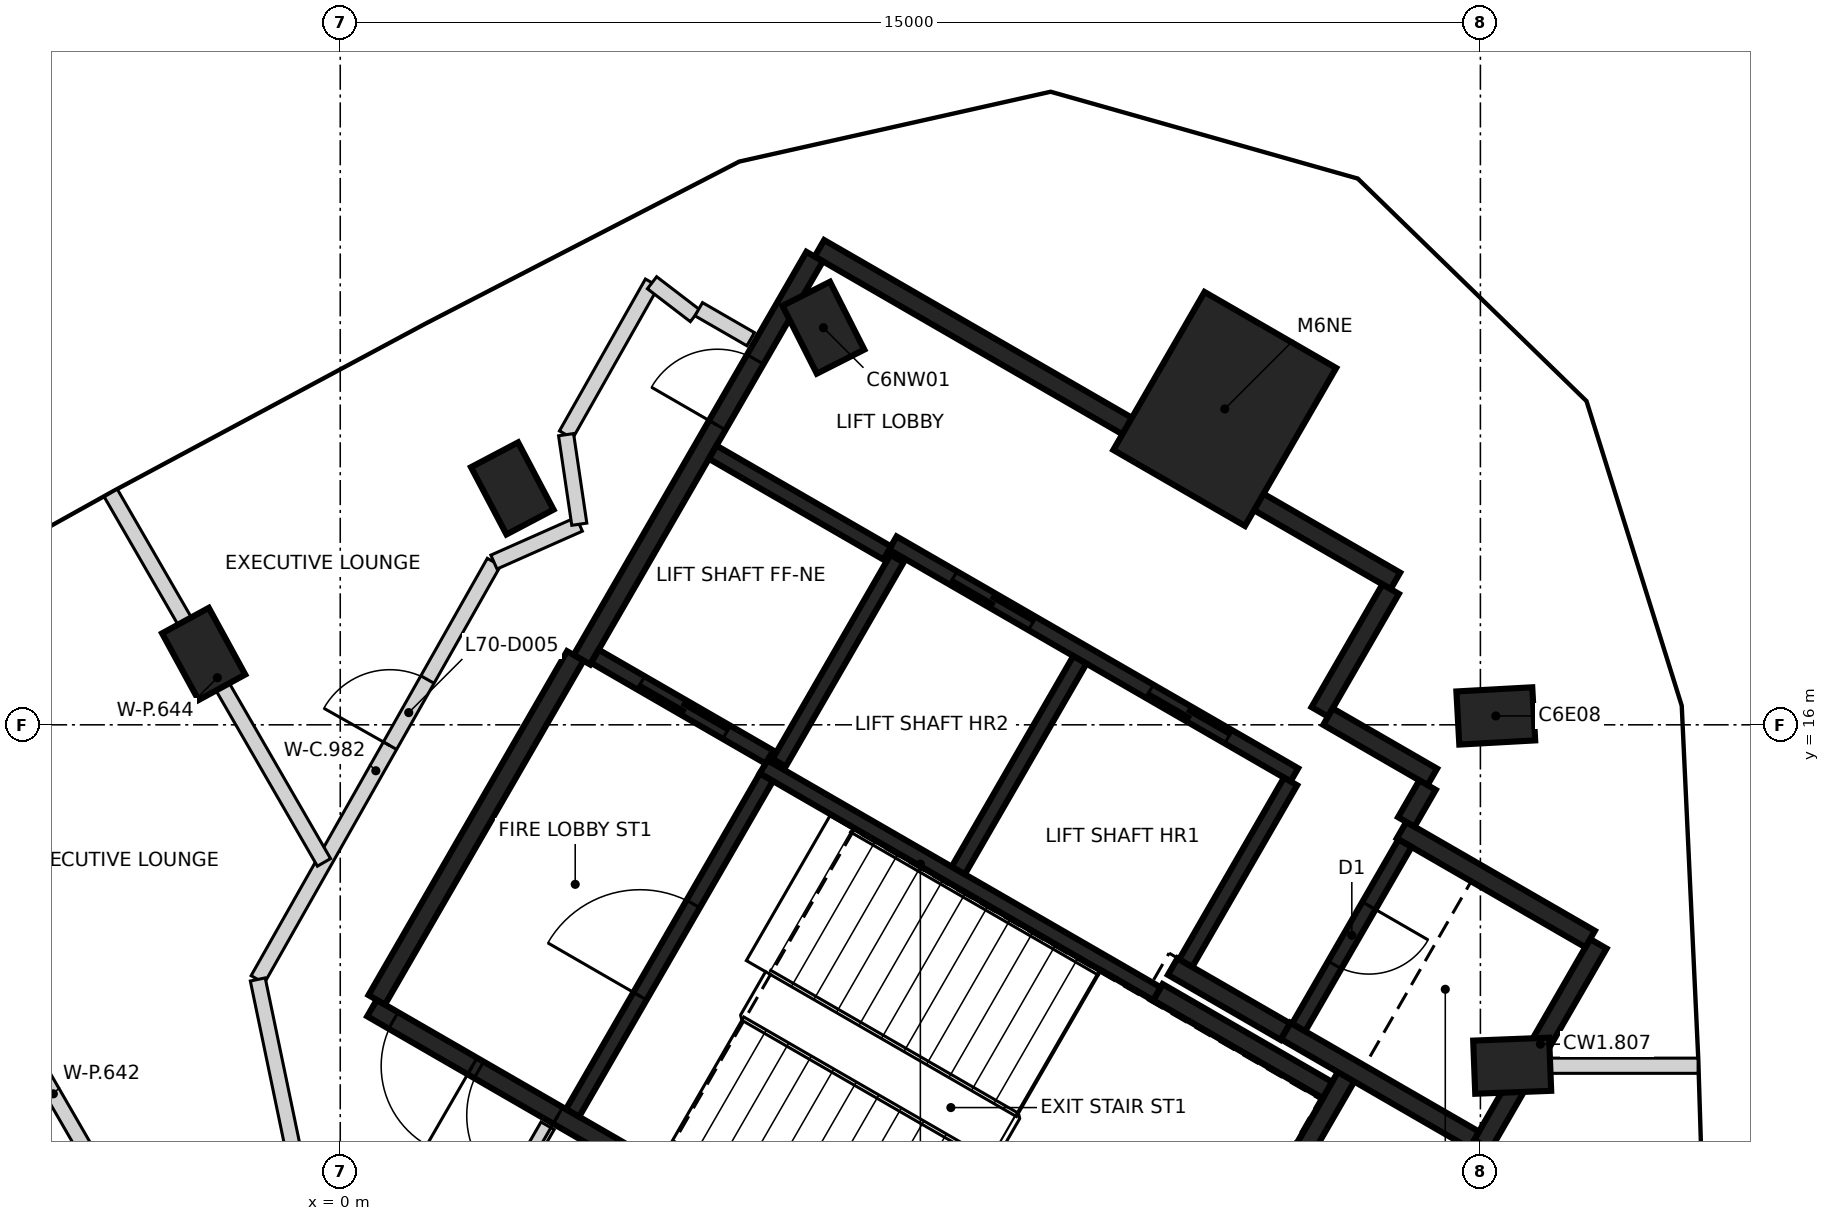
"""IFC4 building model, lengths in metres.
Left out: names, types, materials, properties, quantities, classifications, styles, units other than length and angle.
Written with IfcOpenShell. Run it as: python <this file> out.ifc"""

import sys

from ifc_helpers import new_model, si_unit, direction, frame, frame_2d, origin, origin_2d, place, context, subcontext, project, spatial, rectangle, extrude, element, fill, save


model = new_model("IFC4")
c1 = context("Model", 3, precision=1e-05, world=origin(), true_north=direction((0.0, 1.0)))
c2 = subcontext(c1, "Body", "Model", "MODEL_VIEW")
j1 = project(units=[si_unit("LENGTHUNIT", "METRE"), si_unit("PLANEANGLEUNIT", "RADIAN")], contexts=[c1])
p1 = place(None, origin())
s1 = spatial("IfcSite", under=j1, at=p1, CompositionType="ELEMENT")
p2 = place(p1, origin())
s2 = spatial("IfcBuilding", under=s1, at=p2, CompositionType="ELEMENT")
p3 = place(p2, frame((0.0, 0.0, 276.6)))
s3 = spatial("IfcBuildingStorey", under=s2, at=p3, CompositionType="ELEMENT", Elevation=276.6)
for number, where, z_axis, x_axis in (
    (1, (15.418, 11.515, -0.35), (0.0, 0.0, 1.0), (0.999, 0.039, 0.0)),
    (2, (15.202, 16.117, -0.35), (0.0, 0.0, 1.0), (0.998, 0.055, 0.0)),
    (3, (6.356, 21.224, -0.35), (0.0, 0.0, 1.0), (-0.452, 0.892, 0.0)),
    (4, (2.263, 19.11, -0.35), (0.0, 0.0, 1.0), (-0.466, 0.885, 0.0)),
    (5, (-1.797, 16.932, -0.35), (0.0, 0.0, 1.0), (-0.479, 0.878, 0.0)),
):
    element("IfcColumn", number, at=place(p3, frame(where, z_axis=z_axis, x_axis=x_axis)), inside=s3, PredefinedType="COLUMN", context=c2, shape_type="SweptSolid", body=[
        extrude(rectangle(XDim=1.0, YDim=0.7, at=origin_2d()), origin(), (0.0, 0.0, 1.0), 3.6),
    ])
p4 = place(p3, frame((11.637, 20.155, -0.35), z_axis=(0.0, 0.0, 1.0), x_axis=(0.5, 0.866025403784, 0.0)))
e6 = element("IfcColumn", 6, at=p4, inside=s3, PredefinedType="COLUMN", context=c2, shape_type="SweptSolid", body=[
    extrude(rectangle(XDim=2.4, YDim=2.0, at=origin_2d()), origin(), (0.0, 0.0, 1.0), 3.6),
])
p5 = place(p3, frame((10.42, 6.498, 0.0), z_axis=(0.0, 0.0, 1.0), x_axis=(-0.866021906294, 0.500006057782, 0.0)))
e7 = element("IfcWall", 7, at=p5, inside=s3, PredefinedType="SHEAR", context=c2, shape_type="SweptSolid", body=[
    extrude(rectangle(XDim=11.55, YDim=0.25, at=frame_2d((5.775, 0.0))), origin(), (0.0, 0.0, 1.0), 3.25),
])
p6 = place(p5, frame((10.025, 0.0, 0.0)))
e8 = element("IfcOpeningElement", 8, at=p6, cuts=e7, PredefinedType="OPENING", context=c2, shape_type="SweptSolid", body=[
    extrude(rectangle(XDim=1.2, YDim=2.1, at=frame_2d((0.6, 1.05))), frame((0.0, 0.135, 0.0), z_axis=(0.0, -1.0, 0.0), x_axis=(1.0, 0.0, 0.0)), (0.0, 0.0, 1.0), 0.27),
])
p7 = place(p5, frame((8.725, 0.0, 0.0)))
e9 = element("IfcOpeningElement", 9, at=p7, cuts=e7, PredefinedType="OPENING", context=c2, shape_type="SweptSolid", body=[
    extrude(rectangle(XDim=1.2, YDim=2.1, at=frame_2d((0.6, 1.05))), frame((0.0, 0.135, 0.0), z_axis=(0.0, -1.0, 0.0), x_axis=(1.0, 0.0, 0.0)), (0.0, 0.0, 1.0), 0.27),
])
p8 = place(p3, frame((6.304, 22.269, 0.0), z_axis=(0.0, 0.0, 1.0), x_axis=(0.866022959057, -0.500004234368, 0.0)))
e10 = element("IfcWall", 10, at=p8, inside=s3, PredefinedType="SHEAR", context=c2, shape_type="SweptSolid", body=[
    extrude(rectangle(XDim=8.75, YDim=0.25, at=frame_2d((4.375, 0.0))), origin(), (0.0, 0.0, 1.0), 3.25),
])
p9 = place(p3, frame((3.179, 16.856, 0.0), z_axis=(0.0, 0.0, 1.0), x_axis=(0.500001955336, 0.866024274868, 0.0)))
e11 = element("IfcWall", 11, at=p9, inside=s3, PredefinedType="SHEAR", context=c2, shape_type="SweptSolid", body=[
    extrude(rectangle(XDim=6.125, YDim=0.25, at=frame_2d((3.062, 0.0))), origin(), (0.0, 0.0, 1.0), 3.25),
])
p10 = place(p9, frame((3.563, 0.0, 0.0)))
e12 = element("IfcOpeningElement", 12, at=p10, cuts=e11, PredefinedType="OPENING", context=c2, shape_type="SweptSolid", body=[
    extrude(rectangle(XDim=1.0, YDim=2.1, at=frame_2d((0.5, 1.05))), frame((0.0, 0.135, 0.0), z_axis=(0.0, -1.0, 0.0), x_axis=(1.0, 0.0, 0.0)), (0.0, 0.0, 1.0), 0.27),
])
p11 = place(p3, frame((0.48, 12.381, 0.0), z_axis=(0.0, 0.0, 1.0), x_axis=(0.49999885962, 0.866026062182, 0.0)))
e13 = element("IfcWall", 13, at=p11, inside=s3, PredefinedType="SHEAR", context=c2, shape_type="SweptSolid", body=[
    extrude(rectangle(XDim=5.225, YDim=0.25, at=frame_2d((2.612, 0.0))), origin(), (0.0, 0.0, 1.0), 3.25),
])
p12 = place(p3, frame((13.238, 11.378, 0.0), z_axis=(0.0, 0.0, 1.0), x_axis=(-0.500008851346, -0.866020293397, 0.0)))
e14 = element("IfcWall", 14, at=p12, inside=s3, PredefinedType="SHEAR", context=c2, shape_type="SweptSolid", body=[
    extrude(rectangle(XDim=5.51, YDim=0.25, at=frame_2d((2.755, 0.0))), origin(), (0.0, 0.0, 1.0), 3.25),
])
p13 = place(p3, frame((16.552, 13.119, 0.0), z_axis=(0.0, 0.0, 1.0), x_axis=(-0.499978833458, -0.866037623948, 0.0)))
e15 = element("IfcWall", 15, at=p13, inside=s3, PredefinedType="SHEAR", context=c2, shape_type="SweptSolid", body=[
    extrude(rectangle(XDim=3.05, YDim=0.25, at=frame_2d((1.525, 0.0))), origin(), (0.0, 0.0, 1.0), 3.25),
])
p14 = place(p3, frame((14.918, 10.54, 0.0), z_axis=(0.0, 0.0, 1.0), x_axis=(-0.866063538972, 0.499933942099, 0.0)))
e16 = element("IfcWall", 16, at=p14, inside=s3, PredefinedType="SHEAR", context=c2, shape_type="SweptSolid", body=[
    extrude(rectangle(XDim=2.865, YDim=0.25, at=frame_2d((1.432, 0.0))), origin(), (0.0, 0.0, 1.0), 3.25),
])
p15 = place(p3, frame((13.963, 14.614, 0.0), z_axis=(0.0, 0.0, 1.0), x_axis=(0.866042235819, -0.499970844928, 0.0)))
e17 = element("IfcWall", 17, at=p15, inside=s3, PredefinedType="SHEAR", context=c2, shape_type="SweptSolid", body=[
    extrude(rectangle(XDim=2.865, YDim=0.25, at=frame_2d((1.432, 0.0))), origin(), (0.0, 0.0, 1.0), 3.25),
])
p16 = place(p3, frame((10.757, 12.481, 0.0), z_axis=(0.0, 0.0, 1.0), x_axis=(0.866022940537, -0.500004266446, 0.0)))
e18 = element("IfcWall", 18, at=p16, inside=s3, PredefinedType="SHEAR", context=c2, shape_type="SweptSolid", body=[
    extrude(rectangle(XDim=2.575, YDim=0.25, at=frame_2d((1.287, 0.0))), origin(), (0.0, 0.0, 1.0), 3.25),
])
p17 = place(p3, frame((13.819, 17.785, 0.0), z_axis=(0.0, 0.0, 1.0), x_axis=(-0.500039802285, -0.866002422705, 0.0)))
e19 = element("IfcWall", 19, at=p17, inside=s3, PredefinedType="SHEAR", context=c2, shape_type="SweptSolid", body=[
    extrude(rectangle(XDim=1.865, YDim=0.25, at=frame_2d((0.932, 0.0))), origin(), (0.0, 0.0, 1.0), 3.25),
])
p18 = place(p3, frame((12.433, 11.964, 0.0), z_axis=(0.0, 0.0, 1.0), x_axis=(-0.866038183914, 0.499977863513, 0.0)))
e20 = element("IfcWall", 20, at=p18, inside=s3, PredefinedType="SHEAR", context=c2, shape_type="SweptSolid", body=[
    extrude(rectangle(XDim=1.71, YDim=0.25, at=frame_2d((0.855, 0.0))), origin(), (0.0, 0.0, 1.0), 3.25),
])
p19 = place(p3, frame((12.995, 16.108, 0.0), z_axis=(0.0, 0.0, 1.0), x_axis=(0.866044474677, -0.49996696679, 0.0)))
e21 = element("IfcWall", 21, at=p19, inside=s3, PredefinedType="SHEAR", context=c2, shape_type="SweptSolid", body=[
    extrude(rectangle(XDim=1.584, YDim=0.25, at=frame_2d((0.792, 0.0))), origin(), (0.0, 0.0, 1.0), 3.25),
])
p20 = place(p3, frame((14.305, 15.207, 0.0), z_axis=(0.0, 0.0, 1.0), x_axis=(-0.499848422343, -0.866112899501, 0.0)))
e22 = element("IfcWall", 22, at=p20, inside=s3, PredefinedType="SHEAR", context=c2, shape_type="SweptSolid", body=[
    extrude(rectangle(XDim=0.559, YDim=0.25, at=frame_2d((0.28, 0.0))), origin(), (0.0, 0.0, 1.0), 3.25),
])
p21 = place(p3, frame((12.552, 15.342, 0.0), z_axis=(0.0, 0.0, 1.0), x_axis=(-0.866030299012, 0.499991521122, 0.0)))
e23 = element("IfcWall", 23, at=p21, inside=s3, PredefinedType="SHEAR", context=c2, shape_type="SweptSolid", body=[
    extrude(rectangle(XDim=6.1, YDim=0.2, at=frame_2d((3.05, 0.0))), origin(), (0.0, 0.0, 1.0), 3.25),
])
p22 = place(p21, frame((1.0, 0.0, 0.0)))
e24 = element("IfcOpeningElement", 24, at=p22, cuts=e23, PredefinedType="OPENING", context=c2, shape_type="SweptSolid", body=[
    extrude(rectangle(XDim=1.2, YDim=2.1, at=frame_2d((0.6, 1.05))), frame((0.0, 0.11, 0.0), z_axis=(0.0, -1.0, 0.0), x_axis=(1.0, 0.0, 0.0)), (0.0, 0.0, 1.0), 0.22),
])
p23 = place(p21, frame((3.982, 0.0, 0.0)))
e25 = element("IfcOpeningElement", 25, at=p23, cuts=e23, PredefinedType="OPENING", context=c2, shape_type="SweptSolid", body=[
    extrude(rectangle(XDim=1.2, YDim=2.1, at=frame_2d((0.6, 1.05))), frame((0.0, 0.11, 0.0), z_axis=(0.0, -1.0, 0.0), x_axis=(1.0, 0.0, 0.0)), (0.0, 0.0, 1.0), 0.22),
])
p24 = place(p3, frame((10.743, 12.46, 0.0), z_axis=(0.0, 0.0, 1.0), x_axis=(-0.866018848283, 0.500011354289, 0.0)))
e26 = element("IfcWall", 26, at=p24, inside=s3, PredefinedType="SHEAR", context=c2, shape_type="SweptSolid", body=[
    extrude(rectangle(XDim=5.974, YDim=0.2, at=frame_2d((2.987, 0.0))), origin(), (0.0, 0.0, 1.0), 3.25),
])
p25 = place(p3, frame((3.057, 10.895, 0.0), z_axis=(0.0, 0.0, 1.0), x_axis=(0.500027839223, 0.866009330205, 0.0)))
e27 = element("IfcWall", 27, at=p25, inside=s3, PredefinedType="SHEAR", context=c2, shape_type="SweptSolid", body=[
    extrude(rectangle(XDim=5.098, YDim=0.2, at=frame_2d((2.549, 0.0))), origin(), (0.0, 0.0, 1.0), 3.25),
])
p26 = place(p25, frame((1.774, 0.0, 0.0)))
e28 = element("IfcOpeningElement", 28, at=p26, cuts=e27, PredefinedType="OPENING", context=c2, shape_type="SweptSolid", body=[
    extrude(rectangle(XDim=1.4, YDim=2.1, at=frame_2d((0.7, 1.05))), frame((0.0, 0.11, 0.0), z_axis=(0.0, -1.0, 0.0), x_axis=(1.0, 0.0, 0.0)), (0.0, 0.0, 1.0), 0.22),
])
p27 = place(p3, frame((8.132, 14.084, 0.0), z_axis=(0.0, 0.0, 1.0), x_axis=(0.500030834389, 0.86600760081, 0.0)))
e29 = element("IfcWall", 29, at=p27, inside=s3, PredefinedType="SHEAR", context=c2, shape_type="SweptSolid", body=[
    extrude(rectangle(XDim=3.198, YDim=0.2, at=frame_2d((1.599, 0.0))), origin(), (0.0, 0.0, 1.0), 3.25),
])
p28 = place(p3, frame((14.008, 14.442, 0.0), z_axis=(0.0, 0.0, 1.0), x_axis=(-0.499986818241, -0.866033014143, 0.0)))
e30 = element("IfcWall", 30, at=p28, inside=s3, PredefinedType="SHEAR", context=c2, shape_type="SweptSolid", body=[
    extrude(rectangle(XDim=2.798, YDim=0.2, at=frame_2d((1.399, 0.0))), origin(), (0.0, 0.0, 1.0), 3.25),
])
p29 = place(p28, frame((0.949, 0.0, 0.0)))
e31 = element("IfcOpeningElement", 31, at=p29, cuts=e30, PredefinedType="OPENING", context=c2, shape_type="SweptSolid", body=[
    extrude(rectangle(XDim=0.9, YDim=2.1, at=frame_2d((0.45, 1.05))), frame((0.0, 0.11, 0.0), z_axis=(0.0, -1.0, 0.0), x_axis=(1.0, 0.0, 0.0)), (0.0, 0.0, 1.0), 0.22),
])
p30 = place(p3, frame((12.502, 15.255, 0.0), z_axis=(0.0, 0.0, 1.0), x_axis=(-0.499965018551, -0.866045599391, 0.0)))
e32 = element("IfcWall", 32, at=p30, inside=s3, PredefinedType="SHEAR", context=c2, shape_type="SweptSolid", body=[
    extrude(rectangle(XDim=2.759, YDim=0.2, at=frame_2d((1.379, 0.0))), origin(), (0.0, 0.0, 1.0), 3.25),
])
p31 = place(p3, frame((7.324, 18.187, 0.0), z_axis=(0.0, 0.0, 1.0), x_axis=(-0.499967891604, -0.866043940782, 0.0)))
e33 = element("IfcWall", 33, at=p31, inside=s3, PredefinedType="SHEAR", context=c2, shape_type="SweptSolid", body=[
    extrude(rectangle(XDim=3.1, YDim=0.2, at=frame_2d((1.55, 0.0))), origin(), (0.0, 0.0, 1.0), 3.25),
])
p32 = place(p3, frame((5.646, 15.576, 0.0), z_axis=(0.0, 0.0, 1.0), x_axis=(-0.866018407898, 0.500012117035, 0.0)))
e34 = element("IfcWall", 34, at=p32, inside=s3, PredefinedType="SHEAR", context=c2, shape_type="SweptSolid", body=[
    extrude(rectangle(XDim=2.651, YDim=0.2, at=frame_2d((1.325, 0.0))), origin(), (0.0, 0.0, 1.0), 3.25),
])
p33 = place(p32, frame((0.652, 0.0, 0.0)))
e35 = element("IfcOpeningElement", 35, at=p33, cuts=e34, PredefinedType="OPENING", context=c2, shape_type="SweptSolid", body=[
    extrude(rectangle(XDim=1.3, YDim=2.1, at=frame_2d((0.65, 1.05))), frame((0.0, 0.11, 0.0), z_axis=(0.0, -1.0, 0.0), x_axis=(1.0, 0.0, 0.0)), (0.0, 0.0, 1.0), 0.22),
])
p34 = place(p3, frame((7.196, 18.26, 0.0), z_axis=(0.0, 0.0, 1.0), x_axis=(-0.866018407898, 0.500012117035, 0.0)))
e36 = element("IfcWall", 36, at=p34, inside=s3, PredefinedType="SHEAR", context=c2, shape_type="SweptSolid", body=[
    extrude(rectangle(XDim=2.651, YDim=0.2, at=frame_2d((1.325, 0.0))), origin(), (0.0, 0.0, 1.0), 3.25),
])
p35 = place(p3, frame((-1.086, 12.65, 0.0), z_axis=(0.0, 0.0, 1.0), x_axis=(0.492563383526, 0.870276572826, 0.0)))
e37 = element("IfcWall", 37, at=p35, inside=s3, PredefinedType="PARTITIONING", context=c2, shape_type="SweptSolid", body=[
    extrude(rectangle(XDim=6.309, YDim=0.2, at=frame_2d((3.155, 0.0))), origin(), (0.0, 0.0, 1.0), 3.25),
])
p36 = place(p35, frame((3.533, 0.0, 0.0)))
e38 = element("IfcOpeningElement", 38, at=p36, cuts=e37, PredefinedType="OPENING", context=c2, shape_type="SweptSolid", body=[
    extrude(rectangle(XDim=1.0, YDim=2.1, at=frame_2d((0.5, 1.05))), frame((0.0, 0.11, 0.0), z_axis=(0.0, -1.0, 0.0), x_axis=(1.0, 0.0, 0.0)), (0.0, 0.0, 1.0), 0.22),
])
p37 = place(p3, frame((-1.085, 12.65, 0.0), z_axis=(0.0, 0.0, 1.0), x_axis=(0.203998862084, -0.97897112535, 0.0)))
e39 = element("IfcWall", 39, at=p37, inside=s3, PredefinedType="PARTITIONING", context=c2, shape_type="SweptSolid", body=[
    extrude(rectangle(XDim=6.338, YDim=0.2, at=frame_2d((3.169, 0.0))), origin(), (0.0, 0.0, 1.0), 3.25),
])
p38 = place(p37, frame((2.669, 0.0, 0.0)))
e40 = element("IfcOpeningElement", 40, at=p38, cuts=e39, PredefinedType="OPENING", context=c2, shape_type="SweptSolid", body=[
    extrude(rectangle(XDim=1.0, YDim=2.1, at=frame_2d((0.5, 1.05))), frame((0.0, 0.11, 0.0), z_axis=(0.0, -1.0, 0.0), x_axis=(1.0, 0.0, 0.0)), (0.0, 0.0, 1.0), 0.22),
])
p39 = place(p3, frame((2.022, 18.141, 0.0), z_axis=(0.0, 0.0, 1.0), x_axis=(0.914212683456, 0.405234709036, 0.0)))
e41 = element("IfcWall", 41, at=p39, inside=s3, PredefinedType="PARTITIONING", context=c2, shape_type="SweptSolid", body=[
    extrude(rectangle(XDim=1.229, YDim=0.2, at=frame_2d((0.614, 0.0))), origin(), (0.0, 0.0, 1.0), 3.25),
])
p40 = place(p3, frame((2.231, 9.864, 0.0), z_axis=(0.0, 0.0, 1.0), x_axis=(0.499942098031, 0.866058830921, 0.0)))
e42 = element("IfcWall", 42, at=p40, inside=s3, PredefinedType="PARTITIONING", context=c2, shape_type="SweptSolid", body=[
    extrude(rectangle(XDim=0.994, YDim=0.2, at=frame_2d((0.497, 0.0))), origin(), (0.0, 0.0, 1.0), 3.25),
])
p41 = place(p3, frame((2.971, 19.817, 0.0), z_axis=(0.0, 0.0, 1.0), x_axis=(0.492596700535, 0.870257715061, 0.0)))
e43 = element("IfcWall", 43, at=p41, inside=s3, PredefinedType="PARTITIONING", context=c2, shape_type="SweptSolid", body=[
    extrude(rectangle(XDim=2.296, YDim=0.2, at=frame_2d((1.148, 0.0))), origin(), (0.0, 0.0, 1.0), 3.25),
])
p42 = place(p3, frame((2.971, 19.817, 0.0), z_axis=(0.0, 0.0, 1.0), x_axis=(0.146184555477, -0.989257335449, 0.0)))
e44 = element("IfcWall", 44, at=p42, inside=s3, PredefinedType="PARTITIONING", context=c2, shape_type="SweptSolid", body=[
    extrude(rectangle(XDim=1.191, YDim=0.2, at=frame_2d((0.595, 0.0))), origin(), (0.0, 0.0, 1.0), 2.35),
])
p43 = place(p3, frame((4.102, 21.816, 0.0), z_axis=(0.0, 0.0, 1.0), x_axis=(0.793783006464, -0.608201067615, 0.0)))
e45 = element("IfcWall", 45, at=p43, inside=s3, PredefinedType="PARTITIONING", context=c2, shape_type="SweptSolid", body=[
    extrude(rectangle(XDim=0.712, YDim=0.2, at=frame_2d((0.356, 0.0))), origin(), (0.0, 0.0, 1.0), 3.25),
])
p44 = place(p3, frame((4.716, 21.468, 0.0), z_axis=(0.0, 0.0, 1.0), x_axis=(0.865912682783, -0.500195187698, 0.0)))
e46 = element("IfcWall", 46, at=p44, inside=s3, PredefinedType="PARTITIONING", context=c2, shape_type="SweptSolid", body=[
    extrude(rectangle(XDim=0.79, YDim=0.2, at=frame_2d((0.395, 0.0))), origin(), (0.0, 0.0, 1.0), 3.25),
])
p45 = place(p3, frame((-7.044, 16.809, 0.0), z_axis=(0.0, 0.0, 1.0), x_axis=(0.499997679687, -0.866026743414, 0.0)))
e47 = element("IfcWall", 47, at=p45, inside=s3, PredefinedType="PARTITIONING", context=c2, shape_type="SweptSolid", body=[
    extrude(rectangle(XDim=13.079, YDim=0.2, at=frame_2d((6.54, 0.0))), origin(), (0.0, 0.0, 1.0), 3.25),
])
p46 = place(p3, frame((-3.02, 19.05, 0.0), z_axis=(0.0, 0.0, 1.0), x_axis=(0.499943402613, -0.866058077835, 0.0)))
e48 = element("IfcWall", 48, at=p46, inside=s3, PredefinedType="PARTITIONING", context=c2, shape_type="SweptSolid", body=[
    extrude(rectangle(XDim=5.612, YDim=0.2, at=frame_2d((2.806, 0.0))), origin(), (0.0, 0.0, 1.0), 3.25),
])
p47 = place(p3, frame((15.84, 11.515, 0.0), z_axis=(0.0, 0.0, 1.0), x_axis=(1.0, 0.0, 0.0)))
e49 = element("IfcWall", 49, at=p47, inside=s3, PredefinedType="PARTITIONING", context=c2, shape_type="SweptSolid", body=[
    extrude(rectangle(XDim=2.025, YDim=0.2, at=frame_2d((1.012, 0.0))), origin(), (0.0, 0.0, 1.0), 3.25),
])
p48 = place(p33, origin())
e50 = element("IfcDoor", 50, at=p48, inside=s3, OperationType="SLIDING_TO_RIGHT", PredefinedType="DOOR", context=c2, shape_type="SweptSolid", body=[
    extrude(rectangle(XDim=1.3, YDim=2.1, at=frame_2d((0.65, 1.05))), frame((0.0, 0.025, 0.0), z_axis=(0.0, -1.0, 0.0), x_axis=(1.0, 0.0, 0.0)), (0.0, 0.0, 1.0), 0.05),
])
fill(e35, e50)
p49 = place(p22, origin())
e51 = element("IfcDoor", 51, at=p49, inside=s3, OperationType="DOUBLE_DOOR_SLIDING", PredefinedType="DOOR", context=c2, shape_type="SweptSolid", body=[
    extrude(rectangle(XDim=1.2, YDim=2.1, at=frame_2d((0.6, 1.05))), frame((0.0, 0.025, 0.0), z_axis=(0.0, -1.0, 0.0), x_axis=(1.0, 0.0, 0.0)), (0.0, 0.0, 1.0), 0.05),
])
fill(e24, e51)
p50 = place(p23, origin())
e52 = element("IfcDoor", 52, at=p50, inside=s3, OperationType="DOUBLE_DOOR_SLIDING", PredefinedType="DOOR", context=c2, shape_type="SweptSolid", body=[
    extrude(rectangle(XDim=1.2, YDim=2.1, at=frame_2d((0.6, 1.05))), frame((0.0, 0.025, 0.0), z_axis=(0.0, -1.0, 0.0), x_axis=(1.0, 0.0, 0.0)), (0.0, 0.0, 1.0), 0.05),
])
fill(e25, e52)
p51 = place(p10, origin())
e53 = element("IfcDoor", 53, at=p51, inside=s3, OperationType="SINGLE_SWING_LEFT", PredefinedType="DOOR", context=c2, shape_type="SweptSolid", body=[
    extrude(rectangle(XDim=1.0, YDim=2.1, at=frame_2d((0.5, 1.05))), frame((0.0, 0.025, 0.0), z_axis=(0.0, -1.0, 0.0), x_axis=(1.0, 0.0, 0.0)), (0.0, 0.0, 1.0), 0.05),
])
fill(e12, e53)
p52 = place(p6, origin())
e54 = element("IfcDoor", 54, at=p52, inside=s3, OperationType="SINGLE_SWING_LEFT", PredefinedType="DOOR", context=c2, shape_type="SweptSolid", body=[
    extrude(rectangle(XDim=1.2, YDim=2.1, at=frame_2d((0.6, 1.05))), frame((0.0, 0.025, 0.0), z_axis=(0.0, -1.0, 0.0), x_axis=(1.0, 0.0, 0.0)), (0.0, 0.0, 1.0), 0.05),
])
fill(e8, e54)
p53 = place(p7, origin())
e55 = element("IfcDoor", 55, at=p53, inside=s3, OperationType="SINGLE_SWING_RIGHT", PredefinedType="DOOR", context=c2, shape_type="SweptSolid", body=[
    extrude(rectangle(XDim=1.2, YDim=2.1, at=frame_2d((0.6, 1.05))), frame((0.0, 0.025, 0.0), z_axis=(0.0, -1.0, 0.0), x_axis=(1.0, 0.0, 0.0)), (0.0, 0.0, 1.0), 0.05),
])
fill(e9, e55)
p54 = place(p26, origin())
e56 = element("IfcDoor", 56, at=p54, inside=s3, OperationType="SINGLE_SWING_RIGHT", PredefinedType="DOOR", context=c2, shape_type="SweptSolid", body=[
    extrude(rectangle(XDim=1.4, YDim=2.1, at=frame_2d((0.7, 1.05))), frame((0.0, 0.025, 0.0), z_axis=(0.0, -1.0, 0.0), x_axis=(1.0, 0.0, 0.0)), (0.0, 0.0, 1.0), 0.05),
])
fill(e28, e56)
p55 = place(p29, origin())
e57 = element("IfcDoor", 57, at=p55, inside=s3, OperationType="SINGLE_SWING_LEFT", PredefinedType="DOOR", context=c2, shape_type="SweptSolid", body=[
    extrude(rectangle(XDim=0.9, YDim=2.1, at=frame_2d((0.45, 1.05))), frame((0.0, 0.025, 0.0), z_axis=(0.0, -1.0, 0.0), x_axis=(1.0, 0.0, 0.0)), (0.0, 0.0, 1.0), 0.05),
])
fill(e31, e57)
p56 = place(p36, frame((1.0, 0.0, 0.0), z_axis=(0.0, 0.0, 1.0), x_axis=(-1.0, 0.0, 0.0)))
e58 = element("IfcDoor", 58, at=p56, inside=s3, OperationType="SINGLE_SWING_LEFT", PredefinedType="DOOR", context=c2, shape_type="SweptSolid", body=[
    extrude(rectangle(XDim=1.0, YDim=2.1, at=frame_2d((0.5, 1.05))), frame((0.0, 0.025, 0.0), z_axis=(0.0, -1.0, 0.0), x_axis=(1.0, 0.0, 0.0)), (0.0, 0.0, 1.0), 0.05),
])
fill(e38, e58)
save(model, sys.argv[1])
